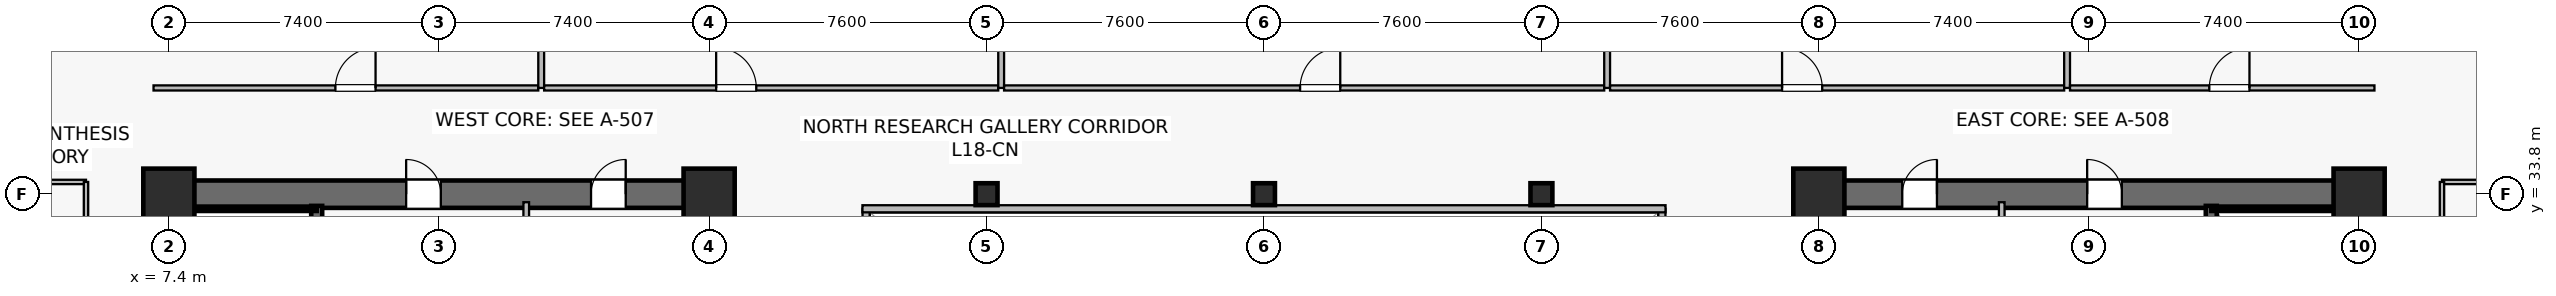
"""IFC4 building model, lengths in metres.
Left out: names, types, materials, properties, quantities, classifications, styles, units other than length and angle.
Written with IfcOpenShell. Run it as: python <this file> out.ifc"""

import sys

from ifc_helpers import new_model, si_unit, direction, frame, frame_2d, origin, origin_2d, place, context, subcontext, project, spatial, rectangle, hollow_rectangle, extrude, source, transform, mapped, element, fill, save


model = new_model("IFC4")
c1 = context("Model", 3, precision=1e-05, world=origin(), true_north=direction((0.0, 1.0)))
c2 = subcontext(c1, "Body", "Model", "MODEL_VIEW")
j1 = project(units=[si_unit("LENGTHUNIT", "METRE"), si_unit("PLANEANGLEUNIT", "RADIAN")], contexts=[c1])
p1 = place(None, origin())
s1 = spatial("IfcSite", under=j1, at=p1, CompositionType="ELEMENT")
p2 = place(p1, origin())
s2 = spatial("IfcBuilding", under=s1, at=p2, CompositionType="ELEMENT")
p3 = place(p2, frame((0.0, 0.0, 74.4)))
s3 = spatial("IfcBuildingStorey", under=s2, at=p3, CompositionType="ELEMENT", Elevation=74.4)
p4 = place(p3, frame((7.025, 33.8, 0.0), z_axis=(0.0, 0.0, 1.0), x_axis=(1.0, 0.0, 0.0)))
e1 = element("IfcWall", 1, at=p4, inside=s3, PredefinedType="SHEAR", context=c2, shape_type="SweptSolid", body=[
    extrude(rectangle(XDim=15.55, YDim=0.75, at=frame_2d((7.775, 0.0))), origin(), (0.0, 0.0, 1.0), 3.78),
])
p5 = place(p4, frame((6.875, 0.0, 0.0)))
e2 = element("IfcOpeningElement", 2, at=p5, cuts=e1, PredefinedType="OPENING", context=c2, shape_type="SweptSolid", body=[
    extrude(rectangle(XDim=0.95, YDim=2.15, at=frame_2d((0.475, 1.075))), frame((0.0, 0.385, 0.0), z_axis=(0.0, -1.0, 0.0), x_axis=(1.0, 0.0, 0.0)), (0.0, 0.0, 1.0), 0.77),
])
p6 = place(p4, frame((11.94, 0.0, 0.0)))
e3 = element("IfcOpeningElement", 3, at=p6, cuts=e1, PredefinedType="OPENING", context=c2, shape_type="SweptSolid", body=[
    extrude(rectangle(XDim=0.95, YDim=2.15, at=frame_2d((0.475, 1.075))), frame((0.0, 0.385, 0.0), z_axis=(0.0, -1.0, 0.0), x_axis=(1.0, 0.0, 0.0)), (0.0, 0.0, 1.0), 0.77),
])
p7 = place(p3, frame((7.4, 15.175, 0.0), z_axis=(0.0, 0.0, 1.0), x_axis=(0.0, 1.0, 0.0)))
e4 = element("IfcWall", 4, at=p7, inside=s3, PredefinedType="SHEAR", context=c2, shape_type="SweptSolid", body=[
    extrude(rectangle(XDim=18.25, YDim=0.75, at=frame_2d((9.125, 0.0))), origin(), (0.0, 0.0, 1.0), 3.78),
])
p8 = place(p3, frame((22.2, 15.175, 0.0), z_axis=(0.0, 0.0, 1.0), x_axis=(0.0, 1.0, 0.0)))
e5 = element("IfcWall", 5, at=p8, inside=s3, PredefinedType="SHEAR", context=c2, shape_type="SweptSolid", body=[
    extrude(rectangle(XDim=18.25, YDim=0.75, at=frame_2d((9.125, 0.0))), origin(), (0.0, 0.0, 1.0), 3.78),
])
p9 = place(p8, frame((3.375, 0.0, 0.0)))
e6 = element("IfcOpeningElement", 6, at=p9, cuts=e5, PredefinedType="OPENING", context=c2, shape_type="SweptSolid", body=[
    extrude(rectangle(XDim=1.42, YDim=2.2, at=frame_2d((0.71, 1.1))), frame((0.0, 0.385, 0.0), z_axis=(0.0, -1.0, 0.0), x_axis=(1.0, 0.0, 0.0)), (0.0, 0.0, 1.0), 0.77),
])
p10 = place(p3, frame((11.45, 24.85, 0.0), z_axis=(0.0, 0.0, 1.0), x_axis=(0.0, 1.0, 0.0)))
e7 = element("IfcWall", 7, at=p10, inside=s3, PredefinedType="SHEAR", context=c2, shape_type="SweptSolid", body=[
    extrude(rectangle(XDim=8.63, YDim=0.3, at=frame_2d((4.315, 0.0))), origin(), (0.0, 0.0, 1.0), 3.78),
])
p11 = place(p10, frame((0.42, 0.0, 0.0)))
e8 = element("IfcOpeningElement", 8, at=p11, cuts=e7, PredefinedType="OPENING", context=c2, shape_type="SweptSolid", body=[
    extrude(rectangle(XDim=1.1, YDim=2.15, at=frame_2d((0.55, 1.075))), frame((0.0, 0.16, 0.0), z_axis=(0.0, -1.0, 0.0), x_axis=(1.0, 0.0, 0.0)), (0.0, 0.0, 1.0), 0.32),
])
p12 = place(p3, frame((7.73, 33.4, 0.0), z_axis=(0.0, 0.0, 1.0), x_axis=(1.0, 0.0, 0.0)))
e9 = element("IfcWall", 9, at=p12, inside=s3, PredefinedType="SOLIDWALL", context=c2, shape_type="SweptSolid", body=[
    extrude(rectangle(XDim=3.72, YDim=0.12, at=frame_2d((1.86, 0.0))), origin(), (0.0, 0.0, 1.0), 3.78),
])
p13 = place(p3, frame((52.225, 33.8, 0.0), z_axis=(0.0, 0.0, 1.0), x_axis=(1.0, 0.0, 0.0)))
e10 = element("IfcWall", 10, at=p13, inside=s3, PredefinedType="SHEAR", context=c2, shape_type="SweptSolid", body=[
    extrude(rectangle(XDim=15.55, YDim=0.75, at=frame_2d((7.775, 0.0))), origin(), (0.0, 0.0, 1.0), 3.78),
])
p14 = place(p13, frame((7.725, 0.0, 0.0)))
e11 = element("IfcOpeningElement", 11, at=p14, cuts=e10, PredefinedType="OPENING", context=c2, shape_type="SweptSolid", body=[
    extrude(rectangle(XDim=0.95, YDim=2.15, at=frame_2d((0.475, 1.075))), frame((0.0, 0.385, 0.0), z_axis=(0.0, -1.0, 0.0), x_axis=(1.0, 0.0, 0.0)), (0.0, 0.0, 1.0), 0.77),
])
p15 = place(p13, frame((2.66, 0.0, 0.0)))
e12 = element("IfcOpeningElement", 12, at=p15, cuts=e10, PredefinedType="OPENING", context=c2, shape_type="SweptSolid", body=[
    extrude(rectangle(XDim=0.95, YDim=2.15, at=frame_2d((0.475, 1.075))), frame((0.0, 0.385, 0.0), z_axis=(0.0, -1.0, 0.0), x_axis=(1.0, 0.0, 0.0)), (0.0, 0.0, 1.0), 0.77),
])
p16 = place(p3, frame((52.6, 15.175, 0.0), z_axis=(0.0, 0.0, 1.0), x_axis=(0.0, 1.0, 0.0)))
e13 = element("IfcWall", 13, at=p16, inside=s3, PredefinedType="SHEAR", context=c2, shape_type="SweptSolid", body=[
    extrude(rectangle(XDim=18.25, YDim=0.75, at=frame_2d((9.125, 0.0))), origin(), (0.0, 0.0, 1.0), 3.78),
])
p17 = place(p16, frame((3.375, 0.0, 0.0)))
e14 = element("IfcOpeningElement", 14, at=p17, cuts=e13, PredefinedType="OPENING", context=c2, shape_type="SweptSolid", body=[
    extrude(rectangle(XDim=1.42, YDim=2.2, at=frame_2d((0.71, 1.1))), frame((0.0, 0.385, 0.0), z_axis=(0.0, -1.0, 0.0), x_axis=(1.0, 0.0, 0.0)), (0.0, 0.0, 1.0), 0.77),
])
p18 = place(p3, frame((67.4, 15.175, 0.0), z_axis=(0.0, 0.0, 1.0), x_axis=(0.0, 1.0, 0.0)))
e15 = element("IfcWall", 15, at=p18, inside=s3, PredefinedType="SHEAR", context=c2, shape_type="SweptSolid", body=[
    extrude(rectangle(XDim=18.25, YDim=0.75, at=frame_2d((9.125, 0.0))), origin(), (0.0, 0.0, 1.0), 3.78),
])
p19 = place(p3, frame((63.35, 24.85, 0.0), z_axis=(0.0, 0.0, 1.0), x_axis=(0.0, 1.0, 0.0)))
e16 = element("IfcWall", 16, at=p19, inside=s3, PredefinedType="SHEAR", context=c2, shape_type="SweptSolid", body=[
    extrude(rectangle(XDim=8.63, YDim=0.3, at=frame_2d((4.315, 0.0))), origin(), (0.0, 0.0, 1.0), 3.78),
])
p20 = place(p19, frame((0.42, 0.0, 0.0)))
e17 = element("IfcOpeningElement", 17, at=p20, cuts=e16, PredefinedType="OPENING", context=c2, shape_type="SweptSolid", body=[
    extrude(rectangle(XDim=1.1, YDim=2.15, at=frame_2d((0.55, 1.075))), frame((0.0, 0.16, 0.0), z_axis=(0.0, -1.0, 0.0), x_axis=(1.0, 0.0, 0.0)), (0.0, 0.0, 1.0), 0.32),
])
p21 = place(p3, frame((63.35, 33.4, 0.0), z_axis=(0.0, 0.0, 1.0), x_axis=(1.0, 0.0, 0.0)))
e18 = element("IfcWall", 18, at=p21, inside=s3, PredefinedType="SOLIDWALL", context=c2, shape_type="SweptSolid", body=[
    extrude(rectangle(XDim=3.72, YDim=0.12, at=frame_2d((1.86, 0.0))), origin(), (0.0, 0.0, 1.0), 3.78),
])
m1 = source(origin(), c2, "Body", "SweptSolid", [
    extrude(rectangle(XDim=1.4, YDim=1.4, at=origin_2d()), origin(), (0.0, 0.0, 1.0), 4.1),
])
for number, where, z_axis, x_axis in (
    (19, (7.4, 33.8, 0.0), (0.0, 0.0, 1.0), (1.0, 0.0, 0.0)),
    (20, (22.2, 33.8, 0.0), (0.0, 0.0, 1.0), (1.0, 0.0, 0.0)),
    (21, (52.6, 33.8, 0.0), (0.0, 0.0, 1.0), (1.0, 0.0, 0.0)),
    (22, (67.4, 33.8, 0.0), (0.0, 0.0, 1.0), (1.0, 0.0, 0.0)),
):
    element("IfcColumn", number, at=place(p3, frame(where, z_axis=z_axis, x_axis=x_axis)), inside=s3, PredefinedType="COLUMN", context=c2, shape_type="MappedRepresentation", body=[
        mapped(m1, transform((0.0, 0.0, 0.0), scale=1.0)),
    ])
m2 = source(origin(), c2, "Body", "SweptSolid", [
    extrude(hollow_rectangle(XDim=0.6, YDim=0.6, WallThickness=0.028, at=origin_2d()), origin(), (0.0, 0.0, 1.0), 4.1),
])
for number, where, z_axis, x_axis in (
    (23, (29.8, 33.8, 0.0), (0.0, 0.0, 1.0), (1.0, 0.0, 0.0)),
    (24, (37.4, 33.8, 0.0), (0.0, 0.0, 1.0), (1.0, 0.0, 0.0)),
    (25, (45.0, 33.8, 0.0), (0.0, 0.0, 1.0), (1.0, 0.0, 0.0)),
):
    element("IfcColumn", number, at=place(p3, frame(where, z_axis=z_axis, x_axis=x_axis)), inside=s3, PredefinedType="COLUMN", context=c2, shape_type="MappedRepresentation", body=[
        mapped(m2, transform((0.0, 0.0, 0.0), scale=1.0)),
    ])
for number, where, z_axis, x_axis in (
    (26, (17.19, 29.65, 0.0), (0.0, 0.0, 1.0), (0.0, 1.0, 0.0)),
    (27, (57.61, 29.65, 0.0), (0.0, 0.0, 1.0), (0.0, 1.0, 0.0)),
):
    element("IfcWall", number, at=place(p3, frame(where, z_axis=z_axis, x_axis=x_axis)), inside=s3, PredefinedType="PLUMBINGWALL", context=c2, shape_type="SweptSolid", body=[
        extrude(rectangle(XDim=3.93, YDim=0.155, at=frame_2d((1.965, 0.0))), origin(), (0.0, 0.0, 1.0), 3.78),
    ])
p22 = place(p3, frame((26.5, 15.2, 0.0), z_axis=(0.0, 0.0, 1.0), x_axis=(0.0, 1.0, 0.0)))
e28 = element("IfcWall", 28, at=p22, inside=s3, PredefinedType="SOLIDWALL", context=c2, shape_type="SweptSolid", body=[
    extrude(rectangle(XDim=18.2, YDim=0.195, at=frame_2d((9.1, 0.0))), origin(), (0.0, 0.0, 1.0), 3.78),
])
p23 = place(p22, frame((1.8, 0.0, 0.9)))
e29 = element("IfcOpeningElement", 29, at=p23, cuts=e28, PredefinedType="OPENING", context=c2, shape_type="SweptSolid", body=[
    extrude(rectangle(XDim=1.5, YDim=1.4, at=frame_2d((0.75, 0.7))), frame((0.0, 0.107, 0.0), z_axis=(0.0, -1.0, 0.0), x_axis=(1.0, 0.0, 0.0)), (0.0, 0.0, 1.0), 0.215),
])
p24 = place(p22, frame((13.2, 0.0, 0.9)))
e30 = element("IfcOpeningElement", 30, at=p24, cuts=e28, PredefinedType="OPENING", context=c2, shape_type="SweptSolid", body=[
    extrude(rectangle(XDim=1.5, YDim=1.4, at=frame_2d((0.75, 0.7))), frame((0.0, 0.107, 0.0), z_axis=(0.0, -1.0, 0.0), x_axis=(1.0, 0.0, 0.0)), (0.0, 0.0, 1.0), 0.215),
])
p25 = place(p3, frame((48.3, 15.2, 0.0), z_axis=(0.0, 0.0, 1.0), x_axis=(0.0, 1.0, 0.0)))
e31 = element("IfcWall", 31, at=p25, inside=s3, PredefinedType="SOLIDWALL", context=c2, shape_type="SweptSolid", body=[
    extrude(rectangle(XDim=18.2, YDim=0.195, at=frame_2d((9.1, 0.0))), origin(), (0.0, 0.0, 1.0), 3.78),
])
p26 = place(p25, frame((1.8, 0.0, 0.9)))
e32 = element("IfcOpeningElement", 32, at=p26, cuts=e31, PredefinedType="OPENING", context=c2, shape_type="SweptSolid", body=[
    extrude(rectangle(XDim=1.5, YDim=1.4, at=frame_2d((0.75, 0.7))), frame((0.0, 0.107, 0.0), z_axis=(0.0, -1.0, 0.0), x_axis=(1.0, 0.0, 0.0)), (0.0, 0.0, 1.0), 0.215),
])
p27 = place(p25, frame((13.2, 0.0, 0.9)))
e33 = element("IfcOpeningElement", 33, at=p27, cuts=e31, PredefinedType="OPENING", context=c2, shape_type="SweptSolid", body=[
    extrude(rectangle(XDim=1.5, YDim=1.4, at=frame_2d((0.75, 0.7))), frame((0.0, 0.107, 0.0), z_axis=(0.0, -1.0, 0.0), x_axis=(1.0, 0.0, 0.0)), (0.0, 0.0, 1.0), 0.215),
])
p28 = place(p3, frame((26.4, 33.4, 0.0), z_axis=(0.0, 0.0, 1.0), x_axis=(1.0, 0.0, 0.0)))
e34 = element("IfcWall", 34, at=p28, inside=s3, PredefinedType="SOLIDWALL", context=c2, shape_type="SweptSolid", body=[
    extrude(rectangle(XDim=22.0, YDim=0.195, at=frame_2d((11.0, 0.0))), origin(), (0.0, 0.0, 1.0), 3.78),
])
p29 = place(p3, frame((6.98, 36.71, 0.0), z_axis=(0.0, 0.0, 1.0), x_axis=(1.0, 0.0, 0.0)))
e35 = element("IfcWall", 35, at=p29, inside=s3, PredefinedType="PARTITIONING", context=c2, shape_type="SweptSolid", body=[
    extrude(rectangle(XDim=10.54, YDim=0.14, at=frame_2d((5.27, 0.0))), origin(), (0.0, 0.0, 1.0), 3.115),
])
p30 = place(p29, frame((4.982, 0.0, 0.0)))
e36 = element("IfcOpeningElement", 36, at=p30, cuts=e35, PredefinedType="OPENING", context=c2, shape_type="SweptSolid", body=[
    extrude(rectangle(XDim=1.1, YDim=2.18, at=frame_2d((0.55, 1.09))), frame((0.0, 0.08, 0.0), z_axis=(0.0, -1.0, 0.0), x_axis=(1.0, 0.0, 0.0)), (0.0, 0.0, 1.0), 0.16),
])
p31 = place(p3, frame((17.6, 36.71, 0.0), z_axis=(0.0, 0.0, 1.0), x_axis=(0.0, 1.0, 0.0)))
e37 = element("IfcWall", 37, at=p31, inside=s3, PredefinedType="PARTITIONING", context=c2, shape_type="SweptSolid", body=[
    extrude(rectangle(XDim=11.78, YDim=0.16, at=frame_2d((5.89, 0.0))), origin(), (0.0, 0.0, 1.0), 3.015),
])
p32 = place(p3, frame((17.68, 36.71, 0.0), z_axis=(0.0, 0.0, 1.0), x_axis=(1.0, 0.0, 0.0)))
e38 = element("IfcWall", 38, at=p32, inside=s3, PredefinedType="PARTITIONING", context=c2, shape_type="SweptSolid", body=[
    extrude(rectangle(XDim=12.44, YDim=0.14, at=frame_2d((6.22, 0.0))), origin(), (0.0, 0.0, 1.0), 3.115),
])
p33 = place(p32, frame((4.712, 0.0, 0.0)))
e39 = element("IfcOpeningElement", 39, at=p33, cuts=e38, PredefinedType="OPENING", context=c2, shape_type="SweptSolid", body=[
    extrude(rectangle(XDim=1.1, YDim=2.18, at=frame_2d((0.55, 1.09))), frame((0.0, 0.08, 0.0), z_axis=(0.0, -1.0, 0.0), x_axis=(1.0, 0.0, 0.0)), (0.0, 0.0, 1.0), 0.16),
])
p34 = place(p3, frame((30.2, 36.71, 0.0), z_axis=(0.0, 0.0, 1.0), x_axis=(0.0, 1.0, 0.0)))
e40 = element("IfcWall", 40, at=p34, inside=s3, PredefinedType="PARTITIONING", context=c2, shape_type="SweptSolid", body=[
    extrude(rectangle(XDim=10.58, YDim=0.16, at=frame_2d((5.29, 0.0))), origin(), (0.0, 0.0, 1.0), 3.015),
])
p35 = place(p3, frame((30.28, 36.71, 0.0), z_axis=(0.0, 0.0, 1.0), x_axis=(1.0, 0.0, 0.0)))
e41 = element("IfcWall", 41, at=p35, inside=s3, PredefinedType="PARTITIONING", context=c2, shape_type="SweptSolid", body=[
    extrude(rectangle(XDim=16.44, YDim=0.14, at=frame_2d((8.22, 0.0))), origin(), (0.0, 0.0, 1.0), 3.115),
])
p36 = place(p35, frame((8.109, 0.0, 0.0)))
e42 = element("IfcOpeningElement", 42, at=p36, cuts=e41, PredefinedType="OPENING", context=c2, shape_type="SweptSolid", body=[
    extrude(rectangle(XDim=1.1, YDim=2.18, at=frame_2d((0.55, 1.09))), frame((0.0, 0.08, 0.0), z_axis=(0.0, -1.0, 0.0), x_axis=(1.0, 0.0, 0.0)), (0.0, 0.0, 1.0), 0.16),
])
p37 = place(p3, frame((46.8, 36.71, 0.0), z_axis=(0.0, 0.0, 1.0), x_axis=(0.0, 1.0, 0.0)))
e43 = element("IfcWall", 43, at=p37, inside=s3, PredefinedType="PARTITIONING", context=c2, shape_type="SweptSolid", body=[
    extrude(rectangle(XDim=10.58, YDim=0.16, at=frame_2d((5.29, 0.0))), origin(), (0.0, 0.0, 1.0), 3.015),
])
p38 = place(p3, frame((46.88, 36.71, 0.0), z_axis=(0.0, 0.0, 1.0), x_axis=(1.0, 0.0, 0.0)))
e44 = element("IfcWall", 44, at=p38, inside=s3, PredefinedType="PARTITIONING", context=c2, shape_type="SweptSolid", body=[
    extrude(rectangle(XDim=12.44, YDim=0.14, at=frame_2d((6.22, 0.0))), origin(), (0.0, 0.0, 1.0), 3.115),
])
p39 = place(p38, frame((4.712, 0.0, 0.0)))
e45 = element("IfcOpeningElement", 45, at=p39, cuts=e44, PredefinedType="OPENING", context=c2, shape_type="SweptSolid", body=[
    extrude(rectangle(XDim=1.1, YDim=2.18, at=frame_2d((0.55, 1.09))), frame((0.0, 0.08, 0.0), z_axis=(0.0, -1.0, 0.0), x_axis=(1.0, 0.0, 0.0)), (0.0, 0.0, 1.0), 0.16),
])
p40 = place(p3, frame((59.4, 36.71, 0.0), z_axis=(0.0, 0.0, 1.0), x_axis=(0.0, 1.0, 0.0)))
e46 = element("IfcWall", 46, at=p40, inside=s3, PredefinedType="PARTITIONING", context=c2, shape_type="SweptSolid", body=[
    extrude(rectangle(XDim=11.78, YDim=0.16, at=frame_2d((5.89, 0.0))), origin(), (0.0, 0.0, 1.0), 3.015),
])
p41 = place(p3, frame((59.48, 36.71, 0.0), z_axis=(0.0, 0.0, 1.0), x_axis=(1.0, 0.0, 0.0)))
e47 = element("IfcWall", 47, at=p41, inside=s3, PredefinedType="PARTITIONING", context=c2, shape_type="SweptSolid", body=[
    extrude(rectangle(XDim=8.34, YDim=0.14, at=frame_2d((4.17, 0.0))), origin(), (0.0, 0.0, 1.0), 3.115),
])
p42 = place(p41, frame((3.816, 0.0, 0.0)))
e48 = element("IfcOpeningElement", 48, at=p42, cuts=e47, PredefinedType="OPENING", context=c2, shape_type="SweptSolid", body=[
    extrude(rectangle(XDim=1.1, YDim=2.18, at=frame_2d((0.55, 1.09))), frame((0.0, 0.08, 0.0), z_axis=(0.0, -1.0, 0.0), x_axis=(1.0, 0.0, 0.0)), (0.0, 0.0, 1.0), 0.16),
])
p43 = place(p3, frame((0.11, 34.135, 0.0), z_axis=(0.0, 0.0, 1.0), x_axis=(1.0, 0.0, 0.0)))
e49 = element("IfcWall", 49, at=p43, inside=s3, PredefinedType="PARTITIONING", context=c2, shape_type="SweptSolid", body=[
    extrude(rectangle(XDim=5.02, YDim=0.12, at=frame_2d((2.51, 0.0))), origin(), (0.0, 0.0, 1.0), 3.78),
])
p44 = place(p3, frame((5.13, 27.26, 0.0), z_axis=(0.0, 0.0, 1.0), x_axis=(0.0, 1.0, 0.0)))
e50 = element("IfcWall", 50, at=p44, inside=s3, PredefinedType="PARTITIONING", context=c2, shape_type="SweptSolid", body=[
    extrude(rectangle(XDim=6.875, YDim=0.12, at=frame_2d((3.438, 0.0))), origin(), (0.0, 0.0, 1.0), 3.78),
])
p45 = place(p44, frame((2.988, 0.0, 0.0)))
e51 = element("IfcOpeningElement", 51, at=p45, cuts=e50, PredefinedType="OPENING", context=c2, shape_type="SweptSolid", body=[
    extrude(rectangle(XDim=0.9, YDim=2.1, at=frame_2d((0.45, 1.05))), frame((0.0, 0.07, 0.0), z_axis=(0.0, -1.0, 0.0), x_axis=(1.0, 0.0, 0.0)), (0.0, 0.0, 1.0), 0.14),
])
p46 = place(p3, frame((69.67, 34.135, 0.0), z_axis=(0.0, 0.0, 1.0), x_axis=(1.0, 0.0, 0.0)))
e52 = element("IfcWall", 52, at=p46, inside=s3, PredefinedType="PARTITIONING", context=c2, shape_type="SweptSolid", body=[
    extrude(rectangle(XDim=5.02, YDim=0.12, at=frame_2d((2.51, 0.0))), origin(), (0.0, 0.0, 1.0), 3.78),
])
p47 = place(p3, frame((69.67, 14.465, 0.0), z_axis=(0.0, 0.0, 1.0), x_axis=(0.0, 1.0, 0.0)))
e53 = element("IfcWall", 53, at=p47, inside=s3, PredefinedType="PARTITIONING", context=c2, shape_type="SweptSolid", body=[
    extrude(rectangle(XDim=19.67, YDim=0.12, at=frame_2d((9.835, 0.0))), origin(), (0.0, 0.0, 1.0), 3.78),
])
p48 = place(p47, frame((9.385, 0.0, 0.0)))
e54 = element("IfcOpeningElement", 54, at=p48, cuts=e53, PredefinedType="OPENING", context=c2, shape_type="SweptSolid", body=[
    extrude(rectangle(XDim=0.9, YDim=2.1, at=frame_2d((0.45, 1.05))), frame((0.0, 0.07, 0.0), z_axis=(0.0, -1.0, 0.0), x_axis=(1.0, 0.0, 0.0)), (0.0, 0.0, 1.0), 0.14),
])
m3 = source(origin(), c2, "Body", "SweptSolid", [
    extrude(rectangle(XDim=0.95, YDim=2.15, at=frame_2d((0.475, 1.075))), frame((0.0, 0.025, 0.0), z_axis=(0.0, -1.0, 0.0), x_axis=(1.0, 0.0, 0.0)), (0.0, 0.0, 1.0), 0.05),
])
p49 = place(p5, origin())
e55 = element("IfcDoor", 55, at=p49, inside=s3, OperationType="SINGLE_SWING_LEFT", PredefinedType="DOOR", context=c2, shape_type="MappedRepresentation", body=[
    mapped(m3, transform((0.0, 0.0, 0.0), scale=1.0)),
])
fill(e2, e55)
p50 = place(p6, origin())
e56 = element("IfcDoor", 56, at=p50, inside=s3, OperationType="SINGLE_SWING_RIGHT", PredefinedType="DOOR", context=c2, shape_type="MappedRepresentation", body=[
    mapped(m3, transform((0.0, 0.0, 0.0), scale=1.0)),
])
fill(e3, e56)
p51 = place(p14, origin())
e57 = element("IfcDoor", 57, at=p51, inside=s3, OperationType="SINGLE_SWING_LEFT", PredefinedType="DOOR", context=c2, shape_type="MappedRepresentation", body=[
    mapped(m3, transform((0.0, 0.0, 0.0), scale=1.0)),
])
fill(e11, e57)
p52 = place(p15, origin())
e58 = element("IfcDoor", 58, at=p52, inside=s3, OperationType="SINGLE_SWING_RIGHT", PredefinedType="DOOR", context=c2, shape_type="MappedRepresentation", body=[
    mapped(m3, transform((0.0, 0.0, 0.0), scale=1.0)),
])
fill(e12, e58)
m4 = source(origin(), c2, "Body", "SweptSolid", [
    extrude(rectangle(XDim=1.1, YDim=2.18, at=frame_2d((0.55, 1.09))), frame((0.0, 0.025, 0.0), z_axis=(0.0, -1.0, 0.0), x_axis=(1.0, 0.0, 0.0)), (0.0, 0.0, 1.0), 0.05),
])
p53 = place(p30, origin())
e59 = element("IfcDoor", 59, at=p53, inside=s3, OperationType="SINGLE_SWING_RIGHT", PredefinedType="DOOR", context=c2, shape_type="MappedRepresentation", body=[
    mapped(m4, transform((0.0, 0.0, 0.0), scale=1.0)),
])
fill(e36, e59)
p54 = place(p33, origin())
e60 = element("IfcDoor", 60, at=p54, inside=s3, OperationType="SINGLE_SWING_LEFT", PredefinedType="DOOR", context=c2, shape_type="MappedRepresentation", body=[
    mapped(m4, transform((0.0, 0.0, 0.0), scale=1.0)),
])
fill(e39, e60)
p55 = place(p36, origin())
e61 = element("IfcDoor", 61, at=p55, inside=s3, OperationType="SINGLE_SWING_RIGHT", PredefinedType="DOOR", context=c2, shape_type="MappedRepresentation", body=[
    mapped(m4, transform((0.0, 0.0, 0.0), scale=1.0)),
])
fill(e42, e61)
p56 = place(p39, origin())
e62 = element("IfcDoor", 62, at=p56, inside=s3, OperationType="SINGLE_SWING_LEFT", PredefinedType="DOOR", context=c2, shape_type="MappedRepresentation", body=[
    mapped(m4, transform((0.0, 0.0, 0.0), scale=1.0)),
])
fill(e45, e62)
p57 = place(p42, origin())
e63 = element("IfcDoor", 63, at=p57, inside=s3, OperationType="SINGLE_SWING_RIGHT", PredefinedType="DOOR", context=c2, shape_type="MappedRepresentation", body=[
    mapped(m4, transform((0.0, 0.0, 0.0), scale=1.0)),
])
fill(e48, e63)
save(model, sys.argv[1])
